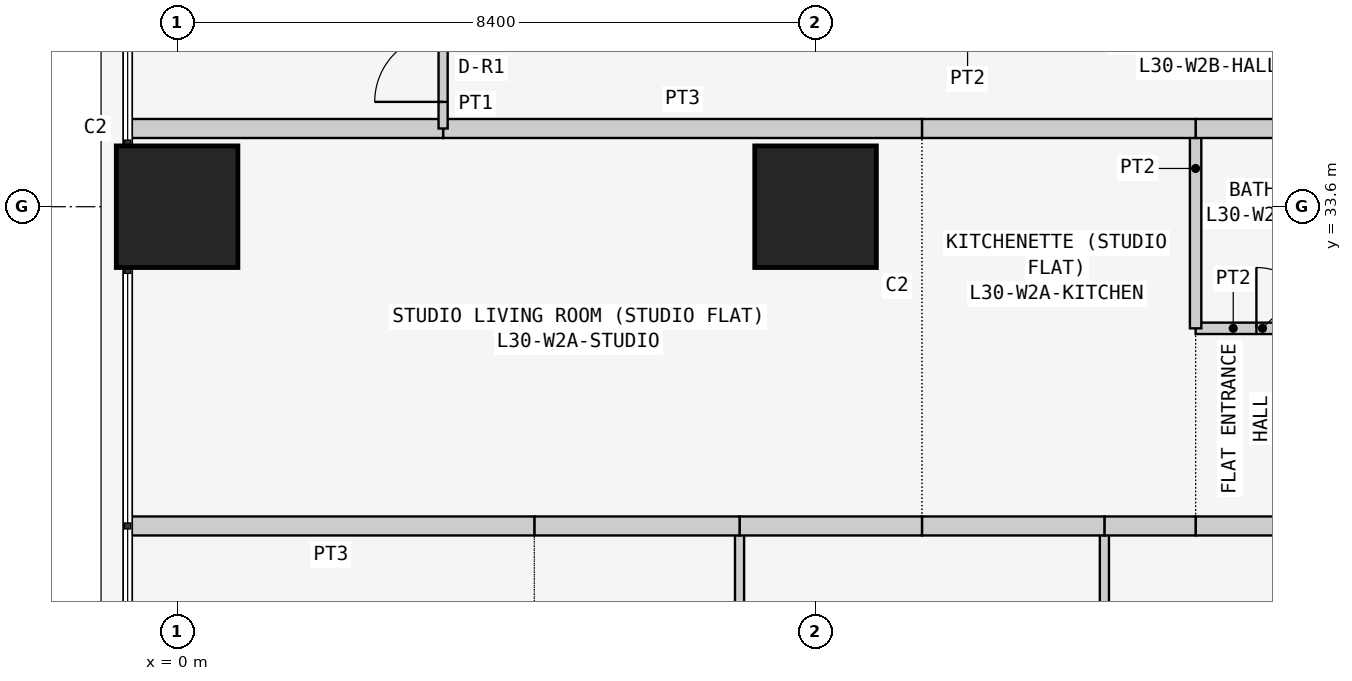
"""IFC4 building model, lengths in metres.
Left out: names, types, materials, properties, quantities, classifications, styles, units other than length and angle.
Written with IfcOpenShell. Run it as: python <this file> out.ifc"""

import sys

from ifc_helpers import new_model, si_unit, direction, frame, frame_2d, origin, origin_2d, place, context, subcontext, project, spatial, rectangle, extrude, element, fill, save


model = new_model("IFC4")
c1 = context("Model", 3, precision=1e-05, world=origin(), true_north=direction((0.0, 1.0)))
c2 = subcontext(c1, "Body", "Model", "MODEL_VIEW")
j1 = project(units=[si_unit("LENGTHUNIT", "METRE"), si_unit("PLANEANGLEUNIT", "RADIAN")], contexts=[c1])
p1 = place(None, origin())
s1 = spatial("IfcSite", under=j1, at=p1, CompositionType="ELEMENT")
p2 = place(p1, origin())
s2 = spatial("IfcBuilding", under=s1, at=p2, CompositionType="ELEMENT")
p3 = place(p2, frame((0.0, 0.0, 119.7)))
s3 = spatial("IfcBuildingStorey", under=s2, at=p3, CompositionType="ELEMENT", Elevation=119.7)
for number, where, z_axis, x_axis in (
    (1, (0.0, 33.6, 0.0), (0.0, 0.0, 1.0), (1.0, 0.0, 0.0)),
    (2, (8.4, 33.6, 0.0), (0.0, 0.0, 1.0), (1.0, 0.0, 0.0)),
):
    element("IfcColumn", number, at=place(p3, frame(where, z_axis=z_axis, x_axis=x_axis)), inside=s3, PredefinedType="COLUMN", context=c2, shape_type="SweptSolid", body=[
        extrude(rectangle(XDim=1.6, YDim=1.6, at=origin_2d()), origin(), (0.0, 0.0, 1.0), 3.6),
    ])
p4 = place(p3, frame((12.2, 29.4, 0.0), z_axis=(0.0, 0.0, 1.0), x_axis=(0.0, -1.0, 0.0)))
e3 = element("IfcWall", 3, at=p4, inside=s3, PredefinedType="PARTITIONING", context=c2, shape_type="SweptSolid", body=[
    extrude(rectangle(XDim=5.229, YDim=0.12, at=frame_2d((2.615, 0.0))), origin(), (0.0, 0.0, 1.0), 3.45),
])
p5 = place(p3, frame((15.875, 29.4, 0.0), z_axis=(0.0, 0.0, 1.0), x_axis=(-1.0, 0.0, 0.0)))
e4 = element("IfcWall", 4, at=p5, inside=s3, PredefinedType="PARTITIONING", context=c2, shape_type="SweptSolid", body=[
    extrude(rectangle(XDim=2.475, YDim=0.25, at=frame_2d((1.238, 0.0))), origin(), (0.0, 0.0, 1.0), 3.45),
])
p6 = place(p3, frame((13.4, 29.4, 0.0), z_axis=(0.0, 0.0, 1.0), x_axis=(-1.0, 0.0, 0.0)))
e5 = element("IfcWall", 5, at=p6, inside=s3, PredefinedType="PARTITIONING", context=c2, shape_type="SweptSolid", body=[
    extrude(rectangle(XDim=1.2, YDim=0.25, at=frame_2d((0.6, 0.0))), origin(), (0.0, 0.0, 1.0), 3.45),
])
p7 = place(p3, frame((7.4, 29.4, 0.0), z_axis=(0.0, 0.0, 1.0), x_axis=(0.0, -1.0, 0.0)))
e6 = element("IfcWall", 6, at=p7, inside=s3, PredefinedType="PARTITIONING", context=c2, shape_type="SweptSolid", body=[
    extrude(rectangle(XDim=5.229, YDim=0.12, at=frame_2d((2.615, 0.0))), origin(), (0.0, 0.0, 1.0), 3.45),
])
p8 = place(p3, frame((12.2, 29.4, 0.0), z_axis=(0.0, 0.0, 1.0), x_axis=(-1.0, 0.0, 0.0)))
e7 = element("IfcWall", 7, at=p8, inside=s3, PredefinedType="PARTITIONING", context=c2, shape_type="SweptSolid", body=[
    extrude(rectangle(XDim=2.4, YDim=0.25, at=frame_2d((1.2, 0.0))), origin(), (0.0, 0.0, 1.0), 3.45),
])
p9 = place(p3, frame((9.8, 29.4, 0.0), z_axis=(0.0, 0.0, 1.0), x_axis=(-1.0, 0.0, 0.0)))
e8 = element("IfcWall", 8, at=p9, inside=s3, PredefinedType="PARTITIONING", context=c2, shape_type="SweptSolid", body=[
    extrude(rectangle(XDim=2.4, YDim=0.25, at=frame_2d((1.2, 0.0))), origin(), (0.0, 0.0, 1.0), 3.45),
])
p10 = place(p3, frame((7.4, 29.4, 0.0), z_axis=(0.0, 0.0, 1.0), x_axis=(-1.0, 0.0, 0.0)))
e9 = element("IfcWall", 9, at=p10, inside=s3, PredefinedType="PARTITIONING", context=c2, shape_type="SweptSolid", body=[
    extrude(rectangle(XDim=2.7, YDim=0.25, at=frame_2d((1.35, 0.0))), origin(), (0.0, 0.0, 1.0), 3.45),
])
p11 = place(p3, frame((4.7, 29.4, 0.0), z_axis=(0.0, 0.0, 1.0), x_axis=(-1.0, 0.0, 0.0)))
e10 = element("IfcWall", 10, at=p11, inside=s3, PredefinedType="PARTITIONING", context=c2, shape_type="SweptSolid", body=[
    extrude(rectangle(XDim=5.35, YDim=0.25, at=frame_2d((2.675, 0.0))), origin(), (0.0, 0.0, 1.0), 3.45),
])
p12 = place(p3, frame((13.4, 32.0, 0.0), z_axis=(0.0, 0.0, 1.0), x_axis=(1.0, 0.0, 0.0)))
e11 = element("IfcWall", 11, at=p12, inside=s3, PredefinedType="PARTITIONING", context=c2, shape_type="SweptSolid", body=[
    extrude(rectangle(XDim=2.475, YDim=0.15, at=frame_2d((1.238, 0.0))), origin(), (0.0, 0.0, 1.0), 3.45),
])
p13 = place(p12, frame((0.8, 0.0, 0.0)))
e12 = element("IfcOpeningElement", 12, at=p13, cuts=e11, PredefinedType="OPENING", context=c2, shape_type="SweptSolid", body=[
    extrude(rectangle(XDim=0.8, YDim=2.1, at=frame_2d((0.4, 1.05))), frame((0.0, 0.085, 0.0), z_axis=(0.0, -1.0, 0.0), x_axis=(1.0, 0.0, 0.0)), (0.0, 0.0, 1.0), 0.17),
])
p14 = place(p3, frame((13.4, 32.0, 0.0), z_axis=(0.0, 0.0, 1.0), x_axis=(0.0, 1.0, 0.0)))
e13 = element("IfcWall", 13, at=p14, inside=s3, PredefinedType="PARTITIONING", context=c2, shape_type="SweptSolid", body=[
    extrude(rectangle(XDim=2.629, YDim=0.15, at=frame_2d((1.314, 0.0))), origin(), (0.0, 0.0, 1.0), 3.45),
])
p15 = place(p3, frame((13.4, 34.629, 0.0), z_axis=(0.0, 0.0, 1.0), x_axis=(1.0, 0.0, 0.0)))
e14 = element("IfcWall", 14, at=p15, inside=s3, PredefinedType="PARTITIONING", context=c2, shape_type="SweptSolid", body=[
    extrude(rectangle(XDim=2.475, YDim=0.25, at=frame_2d((1.238, 0.0))), origin(), (0.0, 0.0, 1.0), 3.45),
])
p16 = place(p3, frame((9.8, 34.629, 0.0), z_axis=(0.0, 0.0, 1.0), x_axis=(1.0, 0.0, 0.0)))
e15 = element("IfcWall", 15, at=p16, inside=s3, PredefinedType="PARTITIONING", context=c2, shape_type="SweptSolid", body=[
    extrude(rectangle(XDim=3.6, YDim=0.25, at=frame_2d((1.8, 0.0))), origin(), (0.0, 0.0, 1.0), 3.45),
])
p17 = place(p3, frame((3.5, 34.629, 0.0), z_axis=(0.0, 0.0, 1.0), x_axis=(1.0, 0.0, 0.0)))
e16 = element("IfcWall", 16, at=p17, inside=s3, PredefinedType="PARTITIONING", context=c2, shape_type="SweptSolid", body=[
    extrude(rectangle(XDim=6.3, YDim=0.25, at=frame_2d((3.15, 0.0))), origin(), (0.0, 0.0, 1.0), 3.45),
])
p18 = place(p3, frame((-0.65, 34.629, 0.0), z_axis=(0.0, 0.0, 1.0), x_axis=(1.0, 0.0, 0.0)))
e17 = element("IfcWall", 17, at=p18, inside=s3, PredefinedType="PARTITIONING", context=c2, shape_type="SweptSolid", body=[
    extrude(rectangle(XDim=4.15, YDim=0.25, at=frame_2d((2.075, 0.0))), origin(), (0.0, 0.0, 1.0), 3.45),
])
p19 = place(p3, frame((3.5, 34.629, 0.0), z_axis=(0.0, 0.0, 1.0), x_axis=(0.0, 1.0, 0.0)))
e18 = element("IfcWall", 18, at=p19, inside=s3, PredefinedType="PARTITIONING", context=c2, shape_type="SweptSolid", body=[
    extrude(rectangle(XDim=1.6, YDim=0.12, at=frame_2d((0.8, 0.0))), origin(), (0.0, 0.0, 1.0), 3.45),
])
p20 = place(p19, frame((0.35, 0.0, 0.0)))
e19 = element("IfcOpeningElement", 19, at=p20, cuts=e18, PredefinedType="OPENING", context=c2, shape_type="SweptSolid", body=[
    extrude(rectangle(XDim=0.9, YDim=2.1, at=frame_2d((0.45, 1.05))), frame((0.0, 0.07, 0.0), z_axis=(0.0, -1.0, 0.0), x_axis=(1.0, 0.0, 0.0)), (0.0, 0.0, 1.0), 0.14),
])
p21 = place(p13, origin())
e20 = element("IfcDoor", 20, at=p21, inside=s3, OperationType="SINGLE_SWING_LEFT", PredefinedType="DOOR", context=c2, shape_type="SweptSolid", body=[
    extrude(rectangle(XDim=0.8, YDim=2.1, at=frame_2d((0.4, 1.05))), frame((0.0, 0.025, 0.0), z_axis=(0.0, -1.0, 0.0), x_axis=(1.0, 0.0, 0.0)), (0.0, 0.0, 1.0), 0.05),
])
fill(e12, e20)
p22 = place(p20, origin())
e21 = element("IfcDoor", 21, at=p22, inside=s3, OperationType="SINGLE_SWING_LEFT", PredefinedType="DOOR", context=c2, shape_type="SweptSolid", body=[
    extrude(rectangle(XDim=0.9, YDim=2.1, at=frame_2d((0.45, 1.05))), frame((0.0, 0.025, 0.0), z_axis=(0.0, -1.0, 0.0), x_axis=(1.0, 0.0, 0.0)), (0.0, 0.0, 1.0), 0.05),
])
fill(e19, e21)
save(model, sys.argv[1])
